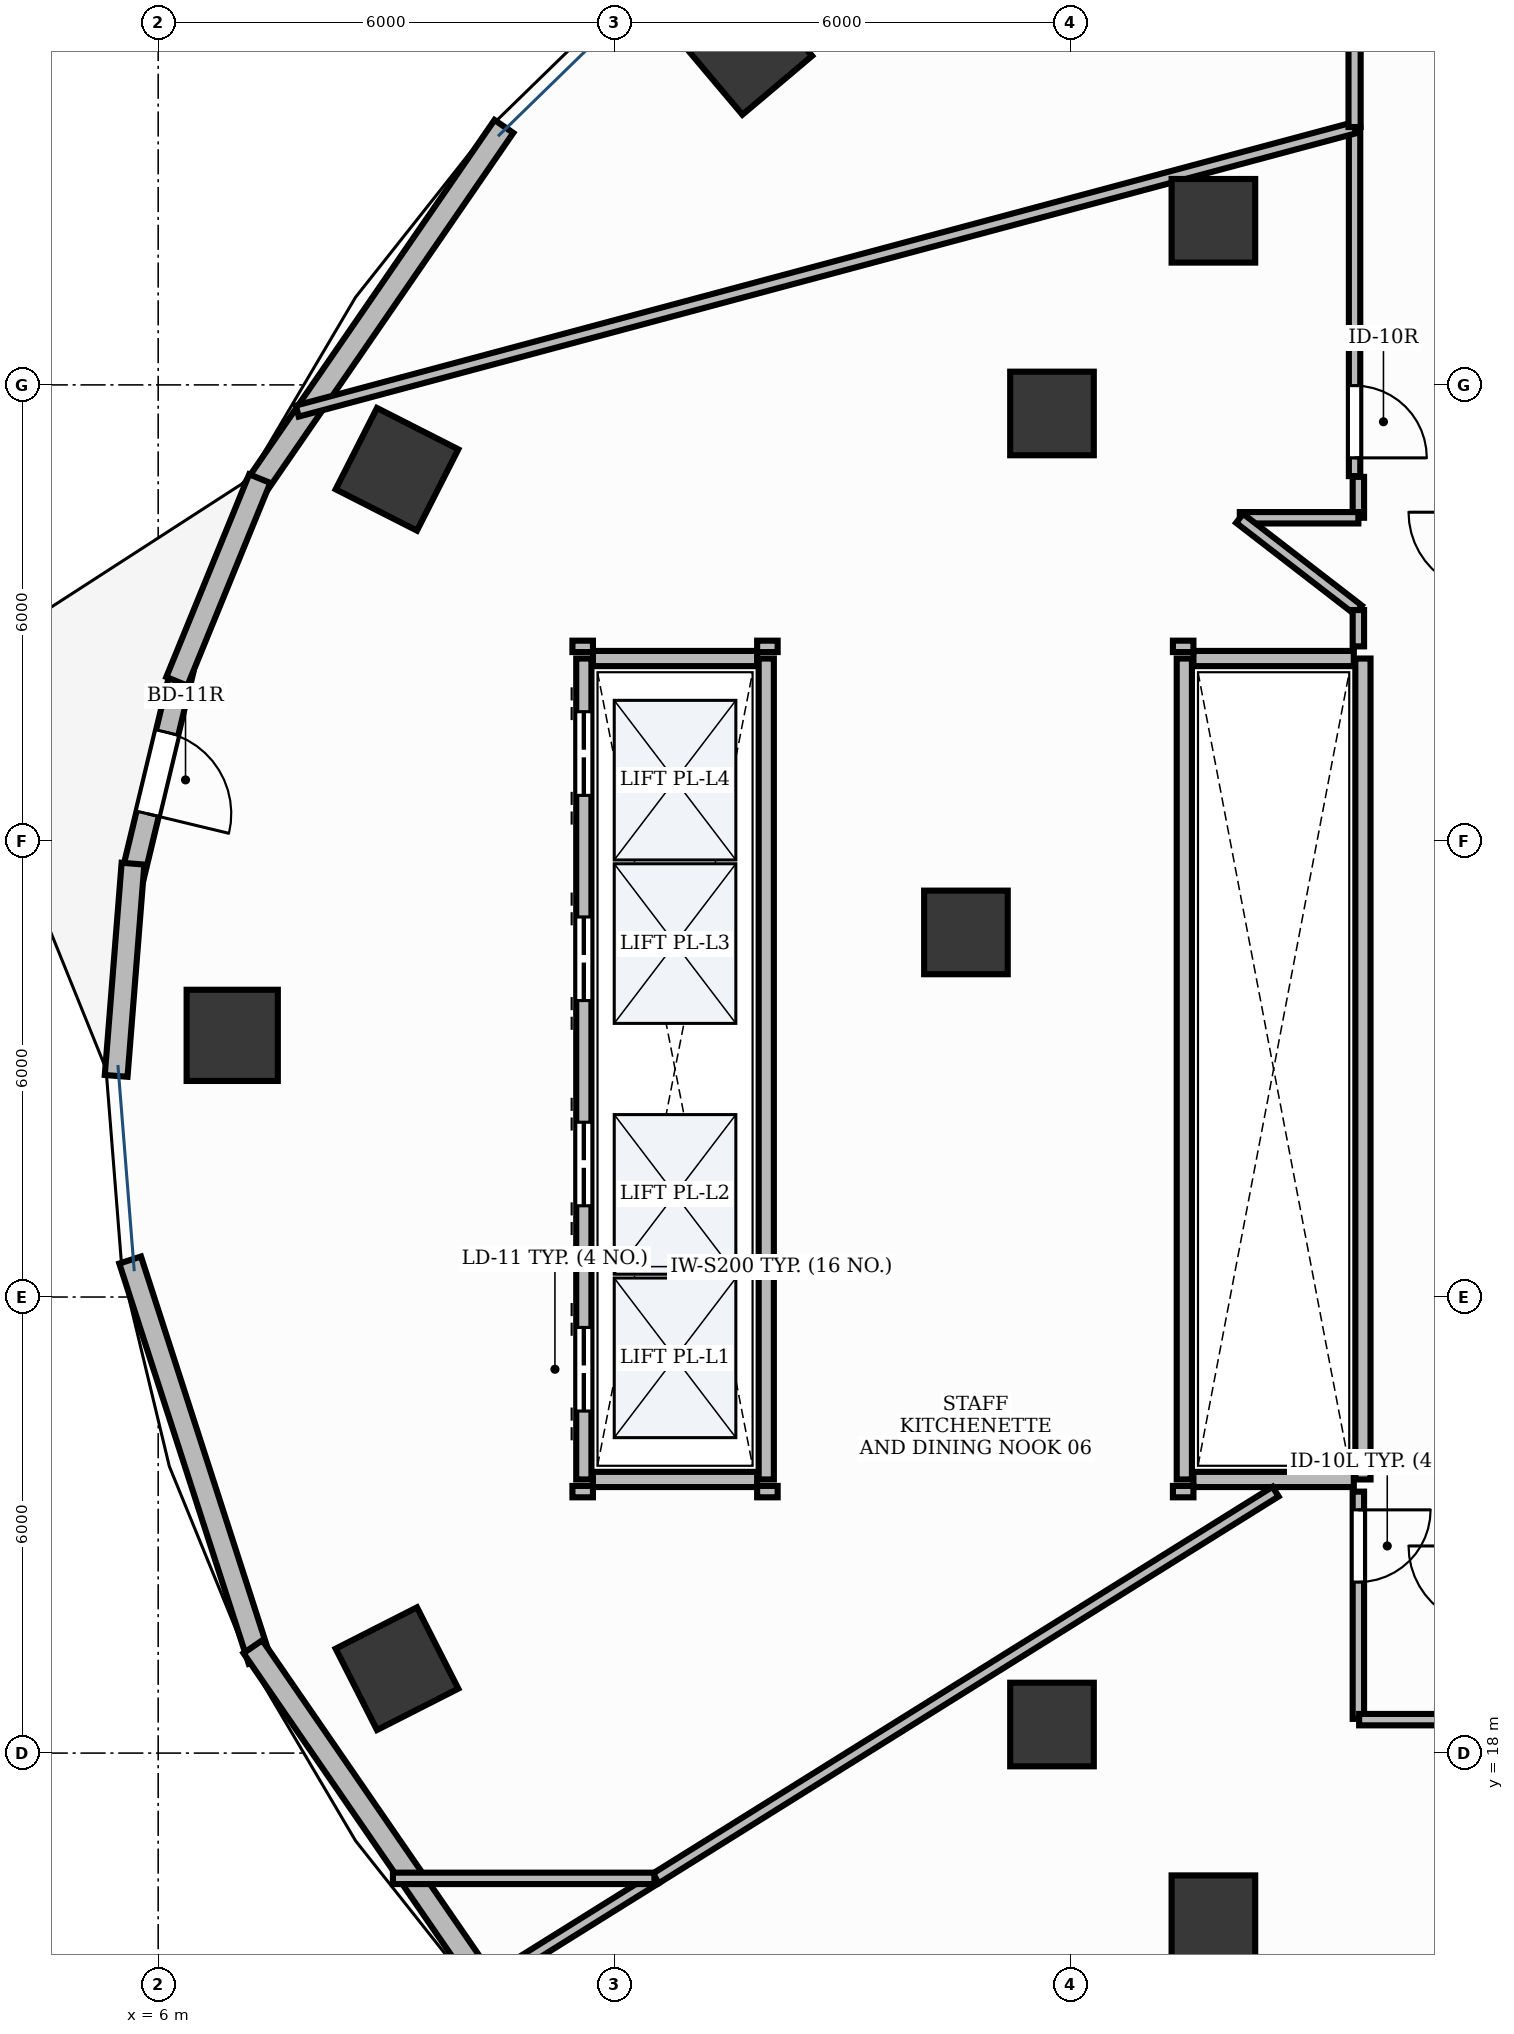
"""IFC4 building model, lengths in metres.
Left out: names, types, materials, properties, quantities, classifications, styles, units other than length and angle.
Written with IfcOpenShell. Run it as: python <this file> out.ifc"""

import sys

from ifc_helpers import new_model, si_unit, direction, frame, frame_2d, origin, origin_2d, place, context, subcontext, project, spatial, rectangle, extrude, element, fill, save


model = new_model("IFC4")
c1 = context("Model", 3, precision=1e-05, world=origin(), true_north=direction((0.0, 1.0)))
c2 = subcontext(c1, "Body", "Model", "MODEL_VIEW")
j1 = project(units=[si_unit("LENGTHUNIT", "METRE"), si_unit("PLANEANGLEUNIT", "RADIAN")], contexts=[c1])
p1 = place(None, origin())
s1 = spatial("IfcSite", under=j1, at=p1, CompositionType="ELEMENT")
p2 = place(p1, origin())
s2 = spatial("IfcBuilding", under=s1, at=p2, CompositionType="ELEMENT")
p3 = place(p2, frame((0.0, 0.0, 136.2)))
s3 = spatial("IfcBuildingStorey", under=s2, at=p3, CompositionType="ELEMENT", Elevation=136.2)
p4 = place(p3, frame((13.758, 40.4, -0.0), z_axis=(0.0, 0.0, 1.0), x_axis=(0.764246456939, 0.644924300253, 0.0)))
e1 = element("IfcColumn", 1, at=p4, inside=s3, PredefinedType="COLUMN", context=c2, shape_type="SweptSolid", body=[
    extrude(rectangle(XDim=1.2, YDim=1.2, at=origin_2d()), origin(), (0.0, 0.0, 1.0), 3.901),
])
p5 = place(p3, frame((19.883, 38.159, -0.0), z_axis=(0.0, 0.0, 1.0), x_axis=(1.0, 0.0, 0.0)))
e2 = element("IfcColumn", 2, at=p5, inside=s3, PredefinedType="COLUMN", context=c2, shape_type="SweptSolid", body=[
    extrude(rectangle(XDim=1.1, YDim=1.1, at=origin_2d()), origin(), (0.0, 0.0, 1.0), 3.901),
])
p6 = place(p3, frame((9.142, 34.889, -0.0), z_axis=(0.0, 0.0, 1.0), x_axis=(0.453057191132, 0.891481453292, 0.0)))
e3 = element("IfcColumn", 3, at=p6, inside=s3, PredefinedType="COLUMN", context=c2, shape_type="SweptSolid", body=[
    extrude(rectangle(XDim=1.2, YDim=1.2, at=origin_2d()), origin(), (0.0, 0.0, 1.0), 3.901),
])
p7 = place(p3, frame((17.759, 35.624, -0.0), z_axis=(0.0, 0.0, 1.0), x_axis=(1.0, 0.0, 0.0)))
e4 = element("IfcColumn", 4, at=p7, inside=s3, PredefinedType="COLUMN", context=c2, shape_type="SweptSolid", body=[
    extrude(rectangle(XDim=1.1, YDim=1.1, at=origin_2d()), origin(), (0.0, 0.0, 1.0), 3.901),
])
p8 = place(p3, frame((6.974, 27.442, -0.0), z_axis=(0.0, 0.0, 1.0), x_axis=(0.0, 1.0, 0.0)))
e5 = element("IfcColumn", 5, at=p8, inside=s3, PredefinedType="COLUMN", context=c2, shape_type="SweptSolid", body=[
    extrude(rectangle(XDim=1.2, YDim=1.2, at=origin_2d()), origin(), (0.0, 0.0, 1.0), 3.901),
])
p9 = place(p3, frame((16.627, 28.797, -0.0), z_axis=(0.0, 0.0, 1.0), x_axis=(1.0, 0.0, 0.0)))
e6 = element("IfcColumn", 6, at=p9, inside=s3, PredefinedType="COLUMN", context=c2, shape_type="SweptSolid", body=[
    extrude(rectangle(XDim=1.1, YDim=1.1, at=origin_2d()), origin(), (0.0, 0.0, 1.0), 3.901),
])
p10 = place(p3, frame((9.142, 19.111, -0.0), z_axis=(0.0, 0.0, 1.0), x_axis=(-0.453057191132, 0.891481453292, 0.0)))
e7 = element("IfcColumn", 7, at=p10, inside=s3, PredefinedType="COLUMN", context=c2, shape_type="SweptSolid", body=[
    extrude(rectangle(XDim=1.2, YDim=1.2, at=origin_2d()), origin(), (0.0, 0.0, 1.0), 3.901),
])
for number, where, z_axis, x_axis in (
    (8, (17.759, 18.376, -0.0), (0.0, 0.0, 1.0), (1.0, 0.0, 0.0)),
    (9, (19.883, 15.841, -0.0), (0.0, 0.0, 1.0), (1.0, 0.0, 0.0)),
):
    element("IfcColumn", number, at=place(p3, frame(where, z_axis=z_axis, x_axis=x_axis)), inside=s3, PredefinedType="COLUMN", context=c2, shape_type="SweptSolid", body=[
        extrude(rectangle(XDim=1.1, YDim=1.1, at=origin_2d()), origin(), (0.0, 0.0, 1.0), 3.901),
    ])
p11 = place(p3, frame((6.316, 32.248, 0.0), z_axis=(0.0, 0.0, 1.0), x_axis=(-0.233687533313, -0.972311748759, 0.0)))
e10 = element("IfcWall", 10, at=p11, inside=s3, PredefinedType="STANDARD", context=c2, shape_type="SweptSolid", body=[
    extrude(rectangle(XDim=2.788, YDim=0.3, at=frame_2d((1.394, 0.0))), origin(), (0.0, 0.0, 1.0), 3.9),
])
p12 = place(p11, frame((0.844, 0.0, 0.0)))
e11 = element("IfcOpeningElement", 11, at=p12, cuts=e10, PredefinedType="OPENING", context=c2, shape_type="SweptSolid", body=[
    extrude(rectangle(XDim=1.1, YDim=2.15, at=frame_2d((0.55, 1.075))), frame((0.0, 0.165, 0.0), z_axis=(0.0, -1.0, 0.0), x_axis=(1.0, 0.0, 0.0)), (0.0, 0.0, 1.0), 0.33),
])
p13 = place(p3, frame((10.548, 39.4, 0.0), z_axis=(0.0, 0.0, 1.0), x_axis=(-0.566825798999, -0.823837674296, 0.0)))
e12 = element("IfcWall", 12, at=p13, inside=s3, PredefinedType="STANDARD", context=c2, shape_type="SweptSolid", body=[
    extrude(rectangle(XDim=5.826, YDim=0.3, at=frame_2d((2.913, 0.0))), origin(), (0.0, 0.0, 1.0), 3.9),
])
p14 = place(p3, frame((7.336, 34.767, 0.0), z_axis=(0.0, 0.0, 1.0), x_axis=(-0.378421675944, -0.925633315722, 0.0)))
e13 = element("IfcWall", 13, at=p14, inside=s3, PredefinedType="STANDARD", context=c2, shape_type="SweptSolid", body=[
    extrude(rectangle(XDim=2.881, YDim=0.3, at=frame_2d((1.441, 0.0))), origin(), (0.0, 0.0, 1.0), 3.9),
])
p15 = place(p3, frame((5.669, 29.701, 0.0), z_axis=(0.0, 0.0, 1.0), x_axis=(-0.079062676622, -0.996869647028, 0.0)))
e14 = element("IfcWall", 14, at=p15, inside=s3, PredefinedType="STANDARD", context=c2, shape_type="SweptSolid", body=[
    extrude(rectangle(XDim=2.801, YDim=0.3, at=frame_2d((1.4, 0.0))), origin(), (0.0, 0.0, 1.0), 3.9),
])
p16 = place(p3, frame((5.632, 24.487, 0.0), z_axis=(0.0, 0.0, 1.0), x_axis=(0.307599470659, -0.951515930319, 0.0)))
e15 = element("IfcWall", 15, at=p16, inside=s3, PredefinedType="STANDARD", context=c2, shape_type="SweptSolid", body=[
    extrude(rectangle(XDim=5.534, YDim=0.3, at=frame_2d((2.767, 0.0))), origin(), (0.0, 0.0, 1.0), 3.47),
])
p17 = place(p3, frame((7.246, 19.399, 0.0), z_axis=(0.0, 0.0, 1.0), x_axis=(0.566825798999, -0.823837674296, 0.0)))
e16 = element("IfcWall", 16, at=p17, inside=s3, PredefinedType="STANDARD", context=c2, shape_type="SweptSolid", body=[
    extrude(rectangle(XDim=5.826, YDim=0.3, at=frame_2d((2.913, 0.0))), origin(), (0.0, 0.0, 1.0), 3.9),
])
p18 = place(p3, frame((11.6, 21.6, 0.0), z_axis=(0.0, 0.0, 1.0), x_axis=(0.0, 1.0, 0.0)))
e17 = element("IfcWall", 17, at=p18, inside=s3, PredefinedType="PARTITIONING", context=c2, shape_type="SweptSolid", body=[
    extrude(rectangle(XDim=10.8, YDim=0.2, at=frame_2d((5.4, 0.0))), origin(), (0.0, 0.0, 1.0), 2.91),
])
p19 = place(p18, frame((0.9, 0.0, 0.0)))
e18 = element("IfcOpeningElement", 18, at=p19, cuts=e17, PredefinedType="OPENING", context=c2, shape_type="SweptSolid", body=[
    extrude(rectangle(XDim=1.1, YDim=2.2, at=frame_2d((0.55, 1.1))), frame((0.0, 0.115, 0.0), z_axis=(0.0, -1.0, 0.0), x_axis=(1.0, 0.0, 0.0)), (0.0, 0.0, 1.0), 0.23),
])
p20 = place(p18, frame((3.6, 0.0, 0.0)))
e19 = element("IfcOpeningElement", 19, at=p20, cuts=e17, PredefinedType="OPENING", context=c2, shape_type="SweptSolid", body=[
    extrude(rectangle(XDim=1.1, YDim=2.2, at=frame_2d((0.55, 1.1))), frame((0.0, 0.115, 0.0), z_axis=(0.0, -1.0, 0.0), x_axis=(1.0, 0.0, 0.0)), (0.0, 0.0, 1.0), 0.23),
])
p21 = place(p18, frame((6.3, 0.0, 0.0)))
e20 = element("IfcOpeningElement", 20, at=p21, cuts=e17, PredefinedType="OPENING", context=c2, shape_type="SweptSolid", body=[
    extrude(rectangle(XDim=1.1, YDim=2.2, at=frame_2d((0.55, 1.1))), frame((0.0, 0.115, 0.0), z_axis=(0.0, -1.0, 0.0), x_axis=(1.0, 0.0, 0.0)), (0.0, 0.0, 1.0), 0.23),
])
p22 = place(p18, frame((9.0, 0.0, 0.0)))
e21 = element("IfcOpeningElement", 21, at=p22, cuts=e17, PredefinedType="OPENING", context=c2, shape_type="SweptSolid", body=[
    extrude(rectangle(XDim=1.1, YDim=2.2, at=frame_2d((0.55, 1.1))), frame((0.0, 0.115, 0.0), z_axis=(0.0, -1.0, 0.0), x_axis=(1.0, 0.0, 0.0)), (0.0, 0.0, 1.0), 0.23),
])
p23 = place(p3, frame((14.0, 21.6, 0.0), z_axis=(0.0, 0.0, 1.0), x_axis=(0.0, 1.0, 0.0)))
e22 = element("IfcWall", 22, at=p23, inside=s3, PredefinedType="PARTITIONING", context=c2, shape_type="SweptSolid", body=[
    extrude(rectangle(XDim=10.8, YDim=0.2, at=frame_2d((5.4, 0.0))), origin(), (0.0, 0.0, 1.0), 2.91),
])
for number, where, z_axis, x_axis in (
    (23, (11.72, 21.6, 0.0), (0.0, 0.0, 1.0), (1.0, 0.0, 0.0)),
    (24, (11.72, 32.4, 0.0), (0.0, 0.0, 1.0), (1.0, 0.0, 0.0)),
):
    element("IfcWall", number, at=place(p3, frame(where, z_axis=z_axis, x_axis=x_axis)), inside=s3, PredefinedType="PARTITIONING", context=c2, shape_type="SweptSolid", body=[
        extrude(rectangle(XDim=2.16, YDim=0.2, at=frame_2d((1.08, 0.0))), origin(), (0.0, 0.0, 1.0), 2.91),
    ])
for number, where, z_axis, x_axis in (
    (25, (19.5, 21.6, 0.0), (0.0, 0.0, 1.0), (0.0, 1.0, 0.0)),
    (26, (21.85, 21.6, 0.0), (0.0, 0.0, 1.0), (0.0, 1.0, 0.0)),
):
    element("IfcWall", number, at=place(p3, frame(where, z_axis=z_axis, x_axis=x_axis)), inside=s3, PredefinedType="PARTITIONING", context=c2, shape_type="SweptSolid", body=[
        extrude(rectangle(XDim=10.8, YDim=0.2, at=frame_2d((5.4, 0.0))), origin(), (0.0, 0.0, 1.0), 2.91),
    ])
for number, where, z_axis, x_axis in (
    (27, (19.62, 21.6, 0.0), (0.0, 0.0, 1.0), (1.0, 0.0, 0.0)),
    (28, (19.62, 32.4, 0.0), (0.0, 0.0, 1.0), (1.0, 0.0, 0.0)),
):
    element("IfcWall", number, at=place(p3, frame(where, z_axis=z_axis, x_axis=x_axis)), inside=s3, PredefinedType="PARTITIONING", context=c2, shape_type="SweptSolid", body=[
        extrude(rectangle(XDim=2.11, YDim=0.2, at=frame_2d((1.055, 0.0))), origin(), (0.0, 0.0, 1.0), 2.91),
    ])
p24 = place(p3, frame((21.79, 21.44, 0.0), z_axis=(0.0, 0.0, 1.0), x_axis=(0.0, -1.0, 0.0)))
e29 = element("IfcWall", 29, at=p24, inside=s3, PredefinedType="PARTITIONING", context=c2, shape_type="SweptSolid", body=[
    extrude(rectangle(XDim=2.99, YDim=0.15, at=frame_2d((1.495, 0.0))), origin(), (0.0, 0.0, 1.0), 2.91),
])
p25 = place(p24, frame((0.24, 0.0, 0.0)))
e30 = element("IfcOpeningElement", 30, at=p25, cuts=e29, PredefinedType="OPENING", context=c2, shape_type="SweptSolid", body=[
    extrude(rectangle(XDim=0.95, YDim=2.15, at=frame_2d((0.475, 1.075))), frame((0.0, 0.09, 0.0), z_axis=(0.0, -1.0, 0.0), x_axis=(1.0, 0.0, 0.0)), (0.0, 0.0, 1.0), 0.18),
])
p26 = place(p3, frame((21.74, 39.383, 0.0), z_axis=(0.0, 0.0, 1.0), x_axis=(0.0, -1.0, 0.0)))
e31 = element("IfcWall", 31, at=p26, inside=s3, PredefinedType="PARTITIONING", context=c2, shape_type="SweptSolid", body=[
    extrude(rectangle(XDim=4.583, YDim=0.15, at=frame_2d((2.291, 0.0))), origin(), (0.0, 0.0, 1.0), 2.91),
])
p27 = place(p26, frame((3.393, 0.0, 0.0)))
e32 = element("IfcOpeningElement", 32, at=p27, cuts=e31, PredefinedType="OPENING", context=c2, shape_type="SweptSolid", body=[
    extrude(rectangle(XDim=0.95, YDim=2.15, at=frame_2d((0.475, 1.075))), frame((0.0, 0.09, 0.0), z_axis=(0.0, -1.0, 0.0), x_axis=(1.0, 0.0, 0.0)), (0.0, 0.0, 1.0), 0.18),
])
p28 = place(p3, frame((10.184, 14.878, 0.0), z_axis=(0.0, 0.0, 1.0), x_axis=(0.848388222263, 0.529374559576, 0.0)))
e33 = element("IfcWall", 33, at=p28, inside=s3, PredefinedType="PARTITIONING", context=c2, shape_type="SweptSolid", body=[
    extrude(rectangle(XDim=2.777, YDim=0.15, at=frame_2d((1.389, 0.0))), origin(), (0.0, 0.0, 1.0), 2.91),
])
p29 = place(p3, frame((12.547, 16.352, 0.0), z_axis=(0.0, 0.0, 1.0), x_axis=(0.848383394499, 0.529382296585, 0.0)))
e34 = element("IfcWall", 34, at=p29, inside=s3, PredefinedType="PARTITIONING", context=c2, shape_type="SweptSolid", body=[
    extrude(rectangle(XDim=9.611, YDim=0.15, at=frame_2d((4.806, 0.0))), origin(), (0.0, 0.0, 1.0), 2.91),
])
p30 = place(p3, frame((21.8, 18.44, 0.0), z_axis=(0.0, 0.0, 1.0), x_axis=(1.0, 0.0, 0.0)))
e35 = element("IfcWall", 35, at=p30, inside=s3, PredefinedType="PARTITIONING", context=c2, shape_type="SweptSolid", body=[
    extrude(rectangle(XDim=1.69, YDim=0.15, at=frame_2d((0.845, 0.0))), origin(), (0.0, 0.0, 1.0), 2.91),
])
p31 = place(p3, frame((7.83, 35.655, 0.0), z_axis=(0.0, 0.0, 1.0), x_axis=(0.965924441149, 0.258824214459, 0.0)))
e36 = element("IfcWall", 36, at=p31, inside=s3, PredefinedType="PARTITIONING", context=c2, shape_type="SweptSolid", body=[
    extrude(rectangle(XDim=14.401, YDim=0.15, at=frame_2d((7.2, 0.0))), origin(), (0.0, 0.0, 1.0), 2.91),
])
p32 = place(p3, frame((21.79, 34.79, 0.0), z_axis=(0.0, 0.0, 1.0), x_axis=(0.0, -1.0, 0.0)))
e37 = element("IfcWall", 37, at=p32, inside=s3, PredefinedType="PARTITIONING", context=c2, shape_type="SweptSolid", body=[
    extrude(rectangle(XDim=0.538, YDim=0.15, at=frame_2d((0.269, 0.0))), origin(), (0.0, 0.0, 1.0), 2.91),
])
p33 = place(p3, frame((21.79, 34.252, 0.0), z_axis=(0.0, 0.0, 1.0), x_axis=(-1.0, 0.0, 0.0)))
e38 = element("IfcWall", 38, at=p33, inside=s3, PredefinedType="PARTITIONING", context=c2, shape_type="SweptSolid", body=[
    extrude(rectangle(XDim=1.56, YDim=0.15, at=frame_2d((0.78, 0.0))), origin(), (0.0, 0.0, 1.0), 2.91),
])
p34 = place(p3, frame((20.228, 34.245, 0.0), z_axis=(0.0, 0.0, 1.0), x_axis=(0.791312192369, -0.611412311135, 0.0)))
e39 = element("IfcWall", 39, at=p34, inside=s3, PredefinedType="PARTITIONING", context=c2, shape_type="SweptSolid", body=[
    extrude(rectangle(XDim=1.975, YDim=0.15, at=frame_2d((0.987, 0.0))), origin(), (0.0, 0.0, 1.0), 2.91),
])
p35 = place(p3, frame((21.79, 33.038, 0.0), z_axis=(0.0, 0.0, 1.0), x_axis=(0.0, -1.0, 0.0)))
e40 = element("IfcWall", 40, at=p35, inside=s3, PredefinedType="PARTITIONING", context=c2, shape_type="SweptSolid", body=[
    extrude(rectangle(XDim=0.478, YDim=0.15, at=frame_2d((0.239, 0.0))), origin(), (0.0, 0.0, 1.0), 2.91),
])
for number, where, z_axis, x_axis in (
    (41, (19.62, 32.56, 0.0), (0.0, 0.0, 1.0), (-1.0, 0.0, 0.0)),
    (42, (19.35, 21.44, 0.0), (0.0, 0.0, 1.0), (1.0, 0.0, 0.0)),
):
    element("IfcWall", number, at=place(p3, frame(where, z_axis=z_axis, x_axis=x_axis)), inside=s3, PredefinedType="PARTITIONING", context=c2, shape_type="SweptSolid", body=[
        extrude(rectangle(XDim=0.27, YDim=0.15, at=frame_2d((0.135, 0.0))), origin(), (0.0, 0.0, 1.0), 2.91),
    ])
p36 = place(p3, frame((12.528, 16.352, 0.0), z_axis=(0.0, 0.0, 1.0), x_axis=(-1.0, 0.0, 0.0)))
e43 = element("IfcWall", 43, at=p36, inside=s3, PredefinedType="PARTITIONING", context=c2, shape_type="SweptSolid", body=[
    extrude(rectangle(XDim=3.439, YDim=0.15, at=frame_2d((1.72, 0.0))), origin(), (0.0, 0.0, 1.0), 2.91),
])
for number, where, z_axis, x_axis in (
    (44, (14.15, 32.56, 0.0), (0.0, 0.0, 1.0), (-1.0, 0.0, 0.0)),
    (45, (11.72, 32.56, 0.0), (0.0, 0.0, 1.0), (-1.0, 0.0, 0.0)),
    (46, (11.45, 21.44, 0.0), (0.0, 0.0, 1.0), (1.0, 0.0, 0.0)),
    (47, (13.88, 21.44, 0.0), (0.0, 0.0, 1.0), (1.0, 0.0, 0.0)),
):
    element("IfcWall", number, at=place(p3, frame(where, z_axis=z_axis, x_axis=x_axis)), inside=s3, PredefinedType="PARTITIONING", context=c2, shape_type="SweptSolid", body=[
        extrude(rectangle(XDim=0.27, YDim=0.15, at=frame_2d((0.135, 0.0))), origin(), (0.0, 0.0, 1.0), 2.91),
    ])
p37 = place(p3, frame((21.74, 40.65, 0.0), z_axis=(0.0, 0.0, 1.0), x_axis=(0.0, -1.0, 0.0)))
e48 = element("IfcWall", 48, at=p37, inside=s3, PredefinedType="PARTITIONING", context=c2, shape_type="SweptSolid", body=[
    extrude(rectangle(XDim=1.257, YDim=0.16, at=frame_2d((0.629, 0.0))), origin(), (0.0, 0.0, 1.0), 2.91),
])
p38 = place(p12, origin())
e49 = element("IfcDoor", 49, at=p38, inside=s3, OperationType="SINGLE_SWING_RIGHT", PredefinedType="DOOR", context=c2, shape_type="SweptSolid", body=[
    extrude(rectangle(XDim=1.1, YDim=2.15, at=frame_2d((0.55, 1.075))), frame((0.0, 0.025, 0.0), z_axis=(0.0, -1.0, 0.0), x_axis=(1.0, 0.0, 0.0)), (0.0, 0.0, 1.0), 0.05),
])
fill(e11, e49)
p39 = place(p19, origin())
e50 = element("IfcDoor", 50, at=p39, inside=s3, OperationType="DOUBLE_DOOR_SLIDING", PredefinedType="DOOR", context=c2, shape_type="SweptSolid", body=[
    extrude(rectangle(XDim=1.1, YDim=2.2, at=frame_2d((0.55, 1.1))), frame((0.0, 0.025, 0.0), z_axis=(0.0, -1.0, 0.0), x_axis=(1.0, 0.0, 0.0)), (0.0, 0.0, 1.0), 0.05),
])
fill(e18, e50)
p40 = place(p20, origin())
e51 = element("IfcDoor", 51, at=p40, inside=s3, OperationType="DOUBLE_DOOR_SLIDING", PredefinedType="DOOR", context=c2, shape_type="SweptSolid", body=[
    extrude(rectangle(XDim=1.1, YDim=2.2, at=frame_2d((0.55, 1.1))), frame((0.0, 0.025, 0.0), z_axis=(0.0, -1.0, 0.0), x_axis=(1.0, 0.0, 0.0)), (0.0, 0.0, 1.0), 0.05),
])
fill(e19, e51)
p41 = place(p21, origin())
e52 = element("IfcDoor", 52, at=p41, inside=s3, OperationType="DOUBLE_DOOR_SLIDING", PredefinedType="DOOR", context=c2, shape_type="SweptSolid", body=[
    extrude(rectangle(XDim=1.1, YDim=2.2, at=frame_2d((0.55, 1.1))), frame((0.0, 0.025, 0.0), z_axis=(0.0, -1.0, 0.0), x_axis=(1.0, 0.0, 0.0)), (0.0, 0.0, 1.0), 0.05),
])
fill(e20, e52)
p42 = place(p22, origin())
e53 = element("IfcDoor", 53, at=p42, inside=s3, OperationType="DOUBLE_DOOR_SLIDING", PredefinedType="DOOR", context=c2, shape_type="SweptSolid", body=[
    extrude(rectangle(XDim=1.1, YDim=2.2, at=frame_2d((0.55, 1.1))), frame((0.0, 0.025, 0.0), z_axis=(0.0, -1.0, 0.0), x_axis=(1.0, 0.0, 0.0)), (0.0, 0.0, 1.0), 0.05),
])
fill(e21, e53)
p43 = place(p25, origin())
e54 = element("IfcDoor", 54, at=p43, inside=s3, OperationType="SINGLE_SWING_LEFT", PredefinedType="DOOR", context=c2, shape_type="SweptSolid", body=[
    extrude(rectangle(XDim=0.95, YDim=2.15, at=frame_2d((0.475, 1.075))), frame((0.0, 0.025, 0.0), z_axis=(0.0, -1.0, 0.0), x_axis=(1.0, 0.0, 0.0)), (0.0, 0.0, 1.0), 0.05),
])
fill(e30, e54)
p44 = place(p27, origin())
e55 = element("IfcDoor", 55, at=p44, inside=s3, OperationType="SINGLE_SWING_RIGHT", PredefinedType="DOOR", context=c2, shape_type="SweptSolid", body=[
    extrude(rectangle(XDim=0.95, YDim=2.15, at=frame_2d((0.475, 1.075))), frame((0.0, 0.025, 0.0), z_axis=(0.0, -1.0, 0.0), x_axis=(1.0, 0.0, 0.0)), (0.0, 0.0, 1.0), 0.05),
])
fill(e32, e55)
save(model, sys.argv[1])
